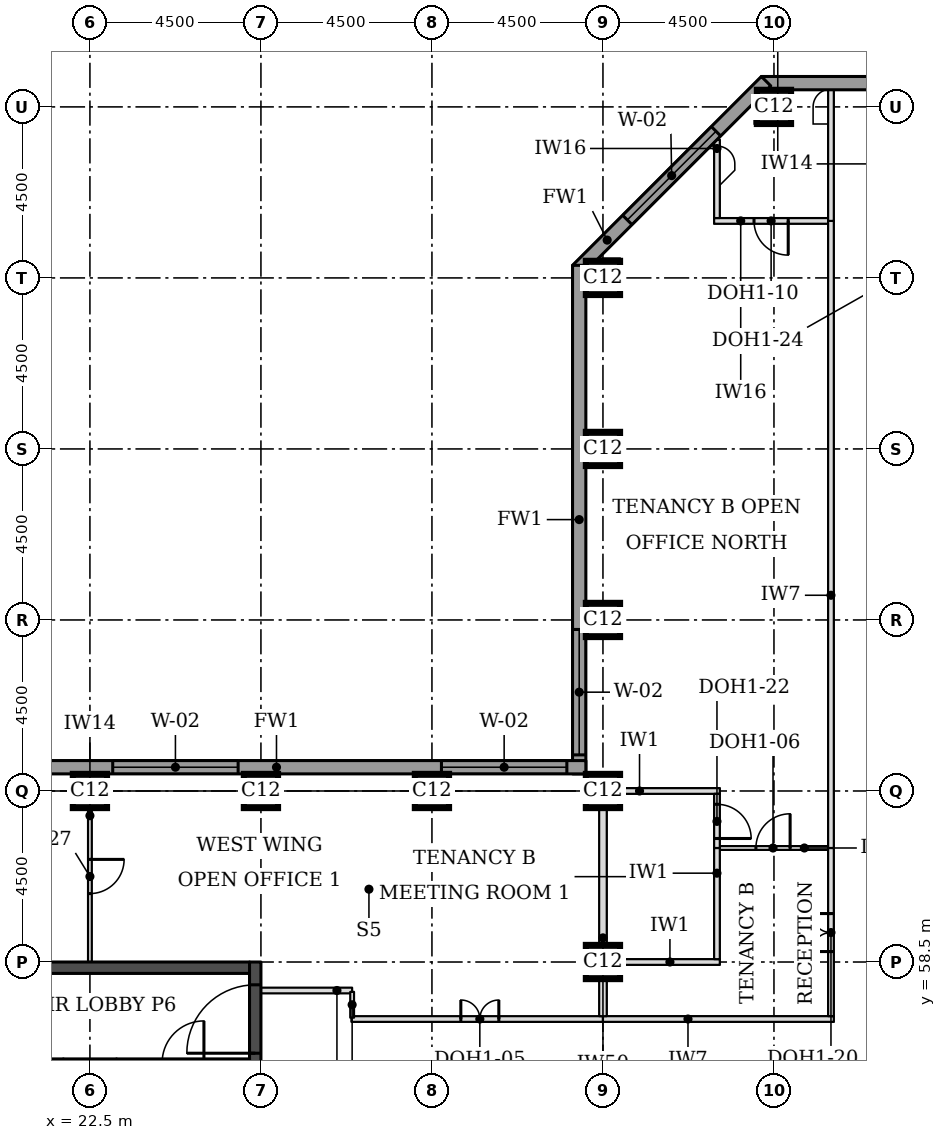
"""IFC4 building model, lengths in metres.
Left out: names, types, materials, properties, quantities, classifications, styles, units other than length and angle.
Written with IfcOpenShell. Run it as: python <this file> out.ifc"""

import sys

from ifc_helpers import new_model, si_unit, direction, frame, frame_2d, origin, origin_2d, place, context, subcontext, project, spatial, rectangle, extrude, element, fill, save


model = new_model("IFC4")
c1 = context("Model", 3, precision=1e-05, world=origin(), true_north=direction((0.0, 1.0)))
c2 = subcontext(c1, "Body", "Model", "MODEL_VIEW")
j1 = project(units=[si_unit("LENGTHUNIT", "METRE"), si_unit("PLANEANGLEUNIT", "RADIAN")], contexts=[c1])
p1 = place(None, origin())
s1 = spatial("IfcSite", under=j1, at=p1, CompositionType="ELEMENT")
p2 = place(p1, origin())
s2 = spatial("IfcBuilding", under=s1, at=p2, CompositionType="ELEMENT")
p3 = place(p2, frame((0.0, 0.0, 147.7)))
s3 = spatial("IfcBuildingStorey", under=s2, at=p3, CompositionType="ELEMENT", Elevation=147.7)
for number, where, z_axis, x_axis in (
    (1, (36.0, 58.5, 0.0), (0.0, 0.0, 1.0), (1.0, 0.0, 0.0)),
    (2, (22.5, 63.0, 0.0), (0.0, 0.0, 1.0), (1.0, 0.0, 0.0)),
    (3, (27.0, 63.0, 0.0), (0.0, 0.0, 1.0), (1.0, 0.0, 0.0)),
    (4, (31.5, 63.0, 0.0), (0.0, 0.0, 1.0), (1.0, 0.0, 0.0)),
    (5, (36.0, 63.0, 0.0), (0.0, 0.0, 1.0), (1.0, 0.0, 0.0)),
    (6, (36.0, 67.5, 0.0), (0.0, 0.0, 1.0), (1.0, 0.0, 0.0)),
    (7, (36.0, 72.0, 0.0), (0.0, 0.0, 1.0), (1.0, 0.0, 0.0)),
    (8, (36.0, 76.5, 0.0), (0.0, 0.0, 1.0), (1.0, 0.0, 0.0)),
    (9, (40.5, 81.0, 0.0), (0.0, 0.0, 1.0), (1.0, 0.0, 0.0)),
):
    element("IfcColumn", number, at=place(p3, frame(where, z_axis=z_axis, x_axis=x_axis)), inside=s3, PredefinedType="COLUMN", context=c2, shape_type="SweptSolid", body=[
        extrude(rectangle(XDim=0.9, YDim=0.9, at=origin_2d()), origin(), (0.0, 0.0, 1.0), 3.7),
    ])
p4 = place(p3, frame((18.3, 58.35, 0.0), z_axis=(0.0, 0.0, 1.0), x_axis=(1.0, 0.0, 0.0)))
e10 = element("IfcWall", 10, at=p4, inside=s3, PredefinedType="SHEAR", context=c2, shape_type="SweptSolid", body=[
    extrude(rectangle(XDim=8.4, YDim=0.3, at=frame_2d((4.2, 0.0))), origin(), (0.0, 0.0, 1.0), 3.7),
])
p5 = place(p3, frame((26.85, 49.5, 0.0), z_axis=(0.0, 0.0, 1.0), x_axis=(0.0, 1.0, 0.0)))
e11 = element("IfcWall", 11, at=p5, inside=s3, PredefinedType="SHEAR", context=c2, shape_type="SweptSolid", body=[
    extrude(rectangle(XDim=9.0, YDim=0.3, at=frame_2d((4.5, 0.0))), origin(), (0.0, 0.0, 1.0), 3.7),
])
p6 = place(p5, frame((6.6, 0.0, 0.0)))
e12 = element("IfcOpeningElement", 12, at=p6, cuts=e11, PredefinedType="OPENING", context=c2, shape_type="SweptSolid", body=[
    extrude(rectangle(XDim=1.8, YDim=2.1, at=frame_2d((0.9, 1.05))), frame((0.0, 0.16, 0.0), z_axis=(0.0, -1.0, 0.0), x_axis=(1.0, 0.0, 0.0)), (0.0, 0.0, 1.0), 0.32),
])
p7 = place(p3, frame((72.331, 81.625, 0.0), z_axis=(0.0, 0.0, 1.0), x_axis=(-1.0, 0.0, 0.0)))
e13 = element("IfcWall", 13, at=p7, inside=s3, PredefinedType="STANDARD", context=c2, shape_type="SweptSolid", body=[
    extrude(rectangle(XDim=32.163, YDim=0.35, at=frame_2d((16.081, 0.0))), origin(), (0.0, 0.0, 1.0), 3.525),
])
p8 = place(p7, frame((5.431, 0.0, 0.9)))
e14 = element("IfcOpeningElement", 14, at=p8, cuts=e13, PredefinedType="OPENING", context=c2, shape_type="SweptSolid", body=[
    extrude(rectangle(XDim=3.3, YDim=1.9, at=frame_2d((1.65, 0.95))), frame((0.0, 0.185, 0.0), z_axis=(0.0, -1.0, 0.0), x_axis=(1.0, 0.0, 0.0)), (0.0, 0.0, 1.0), 0.37),
])
p9 = place(p7, frame((9.931, 0.0, 0.9)))
e15 = element("IfcOpeningElement", 15, at=p9, cuts=e13, PredefinedType="OPENING", context=c2, shape_type="SweptSolid", body=[
    extrude(rectangle(XDim=3.3, YDim=1.9, at=frame_2d((1.65, 0.95))), frame((0.0, 0.185, 0.0), z_axis=(0.0, -1.0, 0.0), x_axis=(1.0, 0.0, 0.0)), (0.0, 0.0, 1.0), 0.37),
])
p10 = place(p7, frame((14.431, 0.0, 0.9)))
e16 = element("IfcOpeningElement", 16, at=p10, cuts=e13, PredefinedType="OPENING", context=c2, shape_type="SweptSolid", body=[
    extrude(rectangle(XDim=3.3, YDim=1.9, at=frame_2d((1.65, 0.95))), frame((0.0, 0.185, 0.0), z_axis=(0.0, -1.0, 0.0), x_axis=(1.0, 0.0, 0.0)), (0.0, 0.0, 1.0), 0.37),
])
p11 = place(p7, frame((18.931, 0.0, 0.9)))
e17 = element("IfcOpeningElement", 17, at=p11, cuts=e13, PredefinedType="OPENING", context=c2, shape_type="SweptSolid", body=[
    extrude(rectangle(XDim=3.3, YDim=1.9, at=frame_2d((1.65, 0.95))), frame((0.0, 0.185, 0.0), z_axis=(0.0, -1.0, 0.0), x_axis=(1.0, 0.0, 0.0)), (0.0, 0.0, 1.0), 0.37),
])
p12 = place(p7, frame((23.431, 0.0, 0.9)))
e18 = element("IfcOpeningElement", 18, at=p12, cuts=e13, PredefinedType="OPENING", context=c2, shape_type="SweptSolid", body=[
    extrude(rectangle(XDim=3.3, YDim=1.9, at=frame_2d((1.65, 0.95))), frame((0.0, 0.185, 0.0), z_axis=(0.0, -1.0, 0.0), x_axis=(1.0, 0.0, 0.0)), (0.0, 0.0, 1.0), 0.37),
])
p13 = place(p3, frame((40.292, 81.676, 0.0), z_axis=(0.0, 0.0, 1.0), x_axis=(-0.707106781187, -0.707106781187, 0.0)))
e19 = element("IfcWall", 19, at=p13, inside=s3, PredefinedType="STANDARD", context=c2, shape_type="SweptSolid", body=[
    extrude(rectangle(XDim=7.027, YDim=0.35, at=frame_2d((3.513, 0.0))), origin(), (0.0, 0.0, 1.0), 3.525),
])
p14 = place(p13, frame((1.863, 0.0, 0.9)))
e20 = element("IfcOpeningElement", 20, at=p14, cuts=e19, PredefinedType="OPENING", context=c2, shape_type="SweptSolid", body=[
    extrude(rectangle(XDim=3.3, YDim=1.9, at=frame_2d((1.65, 0.95))), frame((0.0, 0.185, 0.0), z_axis=(0.0, -1.0, 0.0), x_axis=(1.0, 0.0, 0.0)), (0.0, 0.0, 1.0), 0.37),
])
p15 = place(p3, frame((35.375, 76.831, 0.0), z_axis=(0.0, 0.0, 1.0), x_axis=(0.0, -1.0, 0.0)))
e21 = element("IfcWall", 21, at=p15, inside=s3, PredefinedType="STANDARD", context=c2, shape_type="SweptSolid", body=[
    extrude(rectangle(XDim=13.381, YDim=0.35, at=frame_2d((6.691, 0.0))), origin(), (0.0, 0.0, 1.0), 3.525),
])
p16 = place(p15, frame((9.581, 0.0, 0.9)))
e22 = element("IfcOpeningElement", 22, at=p16, cuts=e21, PredefinedType="OPENING", context=c2, shape_type="SweptSolid", body=[
    extrude(rectangle(XDim=3.3, YDim=1.9, at=frame_2d((1.65, 0.95))), frame((0.0, 0.185, 0.0), z_axis=(0.0, -1.0, 0.0), x_axis=(1.0, 0.0, 0.0)), (0.0, 0.0, 1.0), 0.37),
])
p17 = place(p3, frame((35.55, 63.625, 0.0), z_axis=(0.0, 0.0, 1.0), x_axis=(-1.0, 0.0, 0.0)))
e23 = element("IfcWall", 23, at=p17, inside=s3, PredefinedType="STANDARD", context=c2, shape_type="SweptSolid", body=[
    extrude(rectangle(XDim=17.881, YDim=0.35, at=frame_2d((8.941, 0.0))), origin(), (0.0, 0.0, 1.0), 3.525),
])
p18 = place(p17, frame((0.5, 0.0, 0.9)))
e24 = element("IfcOpeningElement", 24, at=p18, cuts=e23, PredefinedType="OPENING", context=c2, shape_type="SweptSolid", body=[
    extrude(rectangle(XDim=3.3, YDim=1.9, at=frame_2d((1.65, 0.95))), frame((0.0, 0.185, 0.0), z_axis=(0.0, -1.0, 0.0), x_axis=(1.0, 0.0, 0.0)), (0.0, 0.0, 1.0), 0.37),
])
p19 = place(p17, frame((9.15, 0.0, 0.9)))
e25 = element("IfcOpeningElement", 25, at=p19, cuts=e23, PredefinedType="OPENING", context=c2, shape_type="SweptSolid", body=[
    extrude(rectangle(XDim=3.3, YDim=1.9, at=frame_2d((1.65, 0.95))), frame((0.0, 0.185, 0.0), z_axis=(0.0, -1.0, 0.0), x_axis=(1.0, 0.0, 0.0)), (0.0, 0.0, 1.0), 0.37),
])
p20 = place(p3, frame((29.38, 57.0, 0.0), z_axis=(0.0, 0.0, 1.0), x_axis=(1.0, 0.0, 0.0)))
e26 = element("IfcWall", 26, at=p20, inside=s3, PredefinedType="PARTITIONING", context=c2, shape_type="SweptSolid", body=[
    extrude(rectangle(XDim=6.62, YDim=0.15, at=frame_2d((3.31, 0.0))), origin(), (0.0, 0.0, 1.0), 3.55),
])
p21 = place(p20, frame((2.88, 0.0, 0.0)))
e27 = element("IfcOpeningElement", 27, at=p21, cuts=e26, PredefinedType="OPENING", context=c2, shape_type="SweptSolid", body=[
    extrude(rectangle(XDim=1.0, YDim=2.1, at=frame_2d((0.5, 1.05))), frame((0.0, 0.085, 0.0), z_axis=(0.0, -1.0, 0.0), x_axis=(1.0, 0.0, 0.0)), (0.0, 0.0, 1.0), 0.17),
])
p22 = place(p3, frame((36.0, 57.0, 0.0), z_axis=(0.0, 0.0, 1.0), x_axis=(1.0, 0.0, 0.0)))
e28 = element("IfcWall", 28, at=p22, inside=s3, PredefinedType="PARTITIONING", context=c2, shape_type="SweptSolid", body=[
    extrude(rectangle(XDim=6.075, YDim=0.15, at=frame_2d((3.038, 0.0))), origin(), (0.0, 0.0, 1.0), 3.55),
])
p23 = place(p3, frame((36.45, 58.5, 0.0), z_axis=(0.0, 0.0, 1.0), x_axis=(1.0, 0.0, 0.0)))
e29 = element("IfcWall", 29, at=p23, inside=s3, PredefinedType="PARTITIONING", context=c2, shape_type="SweptSolid", body=[
    extrude(rectangle(XDim=2.625, YDim=0.15, at=frame_2d((1.312, 0.0))), origin(), (0.0, 0.0, 1.0), 3.55),
])
p24 = place(p3, frame((39.075, 61.5, 0.0), z_axis=(0.0, 0.0, 1.0), x_axis=(1.0, 0.0, 0.0)))
e30 = element("IfcWall", 30, at=p24, inside=s3, PredefinedType="PARTITIONING", context=c2, shape_type="SweptSolid", body=[
    extrude(rectangle(XDim=2.85, YDim=0.1, at=frame_2d((1.425, 0.0))), origin(), (0.0, 0.0, 1.0), 3.55),
])
p25 = place(p24, frame((0.95, 0.0, 0.0)))
e31 = element("IfcOpeningElement", 31, at=p25, cuts=e30, PredefinedType="OPENING", context=c2, shape_type="SweptSolid", body=[
    extrude(rectangle(XDim=0.9, YDim=2.1, at=frame_2d((0.45, 1.05))), frame((0.0, 0.06, 0.0), z_axis=(0.0, -1.0, 0.0), x_axis=(1.0, 0.0, 0.0)), (0.0, 0.0, 1.0), 0.12),
])
p26 = place(p3, frame((36.45, 63.0, 0.0), z_axis=(0.0, 0.0, 1.0), x_axis=(1.0, 0.0, 0.0)))
e32 = element("IfcWall", 32, at=p26, inside=s3, PredefinedType="PARTITIONING", context=c2, shape_type="SweptSolid", body=[
    extrude(rectangle(XDim=2.625, YDim=0.15, at=frame_2d((1.312, 0.0))), origin(), (0.0, 0.0, 1.0), 3.55),
])
p27 = place(p3, frame((38.925, 78.0, 0.0), z_axis=(0.0, 0.0, 1.0), x_axis=(1.0, 0.0, 0.0)))
e33 = element("IfcWall", 33, at=p27, inside=s3, PredefinedType="PARTITIONING", context=c2, shape_type="SweptSolid", body=[
    extrude(rectangle(XDim=3.0, YDim=0.15, at=frame_2d((1.5, 0.0))), origin(), (0.0, 0.0, 1.0), 3.55),
])
p28 = place(p27, frame((1.05, 0.0, 0.0)))
e34 = element("IfcOpeningElement", 34, at=p28, cuts=e33, PredefinedType="OPENING", context=c2, shape_type="SweptSolid", body=[
    extrude(rectangle(XDim=0.9, YDim=2.1, at=frame_2d((0.45, 1.05))), frame((0.0, 0.085, 0.0), z_axis=(0.0, -1.0, 0.0), x_axis=(1.0, 0.0, 0.0)), (0.0, 0.0, 1.0), 0.17),
])
p29 = place(p3, frame((36.0, 57.075, 0.0), z_axis=(0.0, 0.0, 1.0), x_axis=(0.0, 1.0, 0.0)))
e35 = element("IfcWall", 35, at=p29, inside=s3, PredefinedType="PARTITIONING", context=c2, shape_type="SweptSolid", body=[
    extrude(rectangle(XDim=0.975, YDim=0.2, at=frame_2d((0.488, 0.0))), origin(), (0.0, 0.0, 1.0), 2.8),
])
p30 = place(p3, frame((42.0, 57.075, 0.0), z_axis=(0.0, 0.0, 1.0), x_axis=(0.0, 1.0, 0.0)))
e36 = element("IfcWall", 36, at=p30, inside=s3, PredefinedType="PARTITIONING", context=c2, shape_type="SweptSolid", body=[
    extrude(rectangle(XDim=4.425, YDim=0.15, at=frame_2d((2.212, 0.0))), origin(), (0.0, 0.0, 1.0), 3.55),
])
p31 = place(p30, frame((1.7, 0.0, 0.0)))
e37 = element("IfcOpeningElement", 37, at=p31, cuts=e36, PredefinedType="OPENING", context=c2, shape_type="SweptSolid", body=[
    extrude(rectangle(XDim=1.0, YDim=2.1, at=frame_2d((0.5, 1.05))), frame((0.0, 0.085, 0.0), z_axis=(0.0, -1.0, 0.0), x_axis=(1.0, 0.0, 0.0)), (0.0, 0.0, 1.0), 0.17),
])
p32 = place(p3, frame((39.0, 58.575, 0.0), z_axis=(0.0, 0.0, 1.0), x_axis=(0.0, 1.0, 0.0)))
e38 = element("IfcWall", 38, at=p32, inside=s3, PredefinedType="PARTITIONING", context=c2, shape_type="SweptSolid", body=[
    extrude(rectangle(XDim=2.925, YDim=0.15, at=frame_2d((1.462, 0.0))), origin(), (0.0, 0.0, 1.0), 3.55),
])
p33 = place(p3, frame((36.0, 58.92, 0.0), z_axis=(0.0, 0.0, 1.0), x_axis=(0.0, 1.0, 0.0)))
e39 = element("IfcWall", 39, at=p33, inside=s3, PredefinedType="PARTITIONING", context=c2, shape_type="SweptSolid", body=[
    extrude(rectangle(XDim=3.63, YDim=0.2, at=frame_2d((1.815, 0.0))), origin(), (0.0, 0.0, 1.0), 2.8),
])
p34 = place(p3, frame((39.0, 61.5, 0.0), z_axis=(0.0, 0.0, 1.0), x_axis=(0.0, 1.0, 0.0)))
e40 = element("IfcWall", 40, at=p34, inside=s3, PredefinedType="PARTITIONING", context=c2, shape_type="SweptSolid", body=[
    extrude(rectangle(XDim=1.425, YDim=0.15, at=frame_2d((0.712, 0.0))), origin(), (0.0, 0.0, 1.0), 3.55),
])
p35 = place(p34, frame((0.25, 0.0, 0.0)))
e41 = element("IfcOpeningElement", 41, at=p35, cuts=e40, PredefinedType="OPENING", context=c2, shape_type="SweptSolid", body=[
    extrude(rectangle(XDim=0.9, YDim=2.1, at=frame_2d((0.45, 1.05))), frame((0.0, 0.085, 0.0), z_axis=(0.0, -1.0, 0.0), x_axis=(1.0, 0.0, 0.0)), (0.0, 0.0, 1.0), 0.17),
])
p36 = place(p3, frame((42.0, 61.5, 0.0), z_axis=(0.0, 0.0, 1.0), x_axis=(0.0, 1.0, 0.0)))
e42 = element("IfcWall", 42, at=p36, inside=s3, PredefinedType="PARTITIONING", context=c2, shape_type="SweptSolid", body=[
    extrude(rectangle(XDim=16.5, YDim=0.15, at=frame_2d((8.25, 0.0))), origin(), (0.0, 0.0, 1.0), 3.55),
])
p37 = place(p3, frame((42.0, 78.0, 0.0), z_axis=(0.0, 0.0, 1.0), x_axis=(0.0, 1.0, 0.0)))
e43 = element("IfcWall", 43, at=p37, inside=s3, PredefinedType="PARTITIONING", context=c2, shape_type="SweptSolid", body=[
    extrude(rectangle(XDim=3.45, YDim=0.15, at=frame_2d((1.725, 0.0))), origin(), (0.0, 0.0, 1.0), 3.55),
])
p38 = place(p3, frame((39.0, 78.075, 0.0), z_axis=(0.0, 0.0, 1.0), x_axis=(0.0, 1.0, 0.0)))
e44 = element("IfcWall", 44, at=p38, inside=s3, PredefinedType="PARTITIONING", context=c2, shape_type="SweptSolid", body=[
    extrude(rectangle(XDim=2.062, YDim=0.15, at=frame_2d((1.031, 0.0))), origin(), (0.0, 0.0, 1.0), 3.55),
])
p39 = place(p3, frame((22.5, 63.0, 0.0), z_axis=(0.0, 0.0, 1.0), x_axis=(0.0, -1.0, 0.0)))
e45 = element("IfcWall", 45, at=p39, inside=s3, PredefinedType="PARTITIONING", context=c2, shape_type="SweptSolid", body=[
    extrude(rectangle(XDim=4.5, YDim=0.1, at=frame_2d((2.25, 0.0))), origin(), (0.0, 0.0, 1.0), 3.55),
])
p40 = place(p39, frame((1.8, 0.0, 0.0)))
e46 = element("IfcOpeningElement", 46, at=p40, cuts=e45, PredefinedType="OPENING", context=c2, shape_type="SweptSolid", body=[
    extrude(rectangle(XDim=0.9, YDim=2.1, at=frame_2d((0.45, 1.05))), frame((0.0, 0.06, 0.0), z_axis=(0.0, -1.0, 0.0), x_axis=(1.0, 0.0, 0.0)), (0.0, 0.0, 1.0), 0.12),
])
p41 = place(p3, frame((27.0, 57.75, 0.0), z_axis=(0.0, 0.0, 1.0), x_axis=(1.0, 0.0, 0.0)))
e47 = element("IfcWall", 47, at=p41, inside=s3, PredefinedType="PARTITIONING", context=c2, shape_type="SweptSolid", body=[
    extrude(rectangle(XDim=2.4, YDim=0.15, at=frame_2d((1.2, 0.0))), origin(), (0.0, 0.0, 1.0), 3.55),
])
p42 = place(p3, frame((29.4, 57.715, 0.0), z_axis=(0.0, 0.0, 1.0), x_axis=(0.0, -1.0, 0.0)))
e48 = element("IfcWall", 48, at=p42, inside=s3, PredefinedType="PARTITIONING", context=c2, shape_type="SweptSolid", body=[
    extrude(rectangle(XDim=0.68, YDim=0.1, at=frame_2d((0.34, 0.0))), origin(), (0.0, 0.0, 1.0), 3.55),
])
p43 = place(p3, frame((21.8, 55.85, 0.0), z_axis=(0.0, 0.0, 1.0), x_axis=(1.0, 0.0, 0.0)))
e49 = element("IfcWall", 49, at=p43, inside=s3, PredefinedType="SOLIDWALL", context=c2, shape_type="SweptSolid", body=[
    extrude(rectangle(XDim=1.4, YDim=0.2, at=frame_2d((0.7, 0.0))), origin(), (0.0, 0.0, 1.0), 3.55),
])
p44 = place(p3, frame((18.3, 55.85, 0.0), z_axis=(0.0, 0.0, 1.0), x_axis=(1.0, 0.0, 0.0)))
e50 = element("IfcWall", 50, at=p44, inside=s3, PredefinedType="SOLIDWALL", context=c2, shape_type="SweptSolid", body=[
    extrude(rectangle(XDim=3.5, YDim=0.2, at=frame_2d((1.75, 0.0))), origin(), (0.0, 0.0, 1.0), 3.55),
])
p45 = place(p44, frame((1.2, 0.0, 0.0)))
e51 = element("IfcOpeningElement", 51, at=p45, cuts=e50, PredefinedType="OPENING", context=c2, shape_type="SweptSolid", body=[
    extrude(rectangle(XDim=1.1, YDim=2.1, at=frame_2d((0.55, 1.05))), frame((0.0, 0.11, 0.0), z_axis=(0.0, -1.0, 0.0), x_axis=(1.0, 0.0, 0.0)), (0.0, 0.0, 1.0), 0.22),
])
p46 = place(p3, frame((23.2, 55.85, 0.0), z_axis=(0.0, 0.0, 1.0), x_axis=(1.0, 0.0, 0.0)))
e52 = element("IfcWall", 52, at=p46, inside=s3, PredefinedType="SOLIDWALL", context=c2, shape_type="SweptSolid", body=[
    extrude(rectangle(XDim=3.5, YDim=0.2, at=frame_2d((1.75, 0.0))), origin(), (0.0, 0.0, 1.0), 3.55),
])
p47 = place(p46, frame((1.2, 0.0, 0.0)))
e53 = element("IfcOpeningElement", 53, at=p47, cuts=e52, PredefinedType="OPENING", context=c2, shape_type="SweptSolid", body=[
    extrude(rectangle(XDim=1.1, YDim=2.1, at=frame_2d((0.55, 1.05))), frame((0.0, 0.11, 0.0), z_axis=(0.0, -1.0, 0.0), x_axis=(1.0, 0.0, 0.0)), (0.0, 0.0, 1.0), 0.22),
])
p48 = place(p14, origin())
e54 = element("IfcWindow", 54, at=p48, inside=s3, PartitioningType="SINGLE_PANEL", PredefinedType="WINDOW", context=c2, shape_type="SweptSolid", body=[
    extrude(rectangle(XDim=3.3, YDim=1.9, at=frame_2d((1.65, 0.95))), frame((0.0, 0.085, 0.0), z_axis=(0.0, -1.0, 0.0), x_axis=(1.0, 0.0, 0.0)), (0.0, 0.0, 1.0), 0.06),
])
fill(e20, e54)
p49 = place(p16, origin())
e55 = element("IfcWindow", 55, at=p49, inside=s3, PartitioningType="SINGLE_PANEL", PredefinedType="WINDOW", context=c2, shape_type="SweptSolid", body=[
    extrude(rectangle(XDim=3.3, YDim=1.9, at=frame_2d((1.65, 0.95))), frame((0.0, 0.085, 0.0), z_axis=(0.0, -1.0, 0.0), x_axis=(1.0, 0.0, 0.0)), (0.0, 0.0, 1.0), 0.06),
])
fill(e22, e55)
p50 = place(p18, origin())
e56 = element("IfcWindow", 56, at=p50, inside=s3, PartitioningType="SINGLE_PANEL", PredefinedType="WINDOW", context=c2, shape_type="SweptSolid", body=[
    extrude(rectangle(XDim=3.3, YDim=1.9, at=frame_2d((1.65, 0.95))), frame((0.0, 0.085, 0.0), z_axis=(0.0, -1.0, 0.0), x_axis=(1.0, 0.0, 0.0)), (0.0, 0.0, 1.0), 0.06),
])
fill(e24, e56)
p51 = place(p19, origin())
e57 = element("IfcWindow", 57, at=p51, inside=s3, PartitioningType="SINGLE_PANEL", PredefinedType="WINDOW", context=c2, shape_type="SweptSolid", body=[
    extrude(rectangle(XDim=3.3, YDim=1.9, at=frame_2d((1.65, 0.95))), frame((0.0, 0.085, 0.0), z_axis=(0.0, -1.0, 0.0), x_axis=(1.0, 0.0, 0.0)), (0.0, 0.0, 1.0), 0.06),
])
fill(e25, e57)
p52 = place(p31, origin())
e58 = element("IfcDoor", 58, at=p52, inside=s3, OperationType="DOUBLE_DOOR_SINGLE_SWING", PredefinedType="DOOR", context=c2, shape_type="SweptSolid", body=[
    extrude(rectangle(XDim=1.0, YDim=2.1, at=frame_2d((0.5, 1.05))), frame((0.0, 0.025, 0.0), z_axis=(0.0, -1.0, 0.0), x_axis=(1.0, 0.0, 0.0)), (0.0, 0.0, 1.0), 0.05),
])
fill(e37, e58)
p53 = place(p25, origin())
e59 = element("IfcDoor", 59, at=p53, inside=s3, OperationType="SINGLE_SWING_RIGHT", PredefinedType="DOOR", context=c2, shape_type="SweptSolid", body=[
    extrude(rectangle(XDim=0.9, YDim=2.1, at=frame_2d((0.45, 1.05))), frame((0.0, 0.025, 0.0), z_axis=(0.0, -1.0, 0.0), x_axis=(1.0, 0.0, 0.0)), (0.0, 0.0, 1.0), 0.05),
])
fill(e31, e59)
p54 = place(p28, frame((0.9, 0.0, 0.0), z_axis=(0.0, 0.0, 1.0), x_axis=(-1.0, 0.0, 0.0)))
e60 = element("IfcDoor", 60, at=p54, inside=s3, OperationType="SINGLE_SWING_LEFT", PredefinedType="DOOR", context=c2, shape_type="SweptSolid", body=[
    extrude(rectangle(XDim=0.9, YDim=2.1, at=frame_2d((0.45, 1.05))), frame((0.0, 0.025, 0.0), z_axis=(0.0, -1.0, 0.0), x_axis=(1.0, 0.0, 0.0)), (0.0, 0.0, 1.0), 0.05),
])
fill(e34, e60)
p55 = place(p35, frame((0.9, 0.0, 0.0), z_axis=(0.0, 0.0, 1.0), x_axis=(-1.0, 0.0, 0.0)))
e61 = element("IfcDoor", 61, at=p55, inside=s3, OperationType="SINGLE_SWING_RIGHT", PredefinedType="DOOR", context=c2, shape_type="SweptSolid", body=[
    extrude(rectangle(XDim=0.9, YDim=2.1, at=frame_2d((0.45, 1.05))), frame((0.0, 0.025, 0.0), z_axis=(0.0, -1.0, 0.0), x_axis=(1.0, 0.0, 0.0)), (0.0, 0.0, 1.0), 0.05),
])
fill(e41, e61)
p56 = place(p21, origin())
e62 = element("IfcDoor", 62, at=p56, inside=s3, OperationType="DOUBLE_DOOR_SINGLE_SWING", PredefinedType="DOOR", context=c2, shape_type="SweptSolid", body=[
    extrude(rectangle(XDim=1.0, YDim=2.1, at=frame_2d((0.5, 1.05))), frame((0.0, 0.025, 0.0), z_axis=(0.0, -1.0, 0.0), x_axis=(1.0, 0.0, 0.0)), (0.0, 0.0, 1.0), 0.05),
])
fill(e27, e62)
p57 = place(p40, origin())
e63 = element("IfcDoor", 63, at=p57, inside=s3, OperationType="SINGLE_SWING_LEFT", PredefinedType="DOOR", context=c2, shape_type="SweptSolid", body=[
    extrude(rectangle(XDim=0.9, YDim=2.1, at=frame_2d((0.45, 1.05))), frame((0.0, 0.025, 0.0), z_axis=(0.0, -1.0, 0.0), x_axis=(1.0, 0.0, 0.0)), (0.0, 0.0, 1.0), 0.05),
])
fill(e46, e63)
p58 = place(p6, origin())
e64 = element("IfcDoor", 64, at=p58, inside=s3, OperationType="SINGLE_SWING_LEFT", PredefinedType="DOOR", context=c2, shape_type="SweptSolid", body=[
    extrude(rectangle(XDim=1.8, YDim=2.1, at=frame_2d((0.9, 1.05))), frame((0.0, 0.025, 0.0), z_axis=(0.0, -1.0, 0.0), x_axis=(1.0, 0.0, 0.0)), (0.0, 0.0, 1.0), 0.05),
])
fill(e12, e64)
save(model, sys.argv[1])
